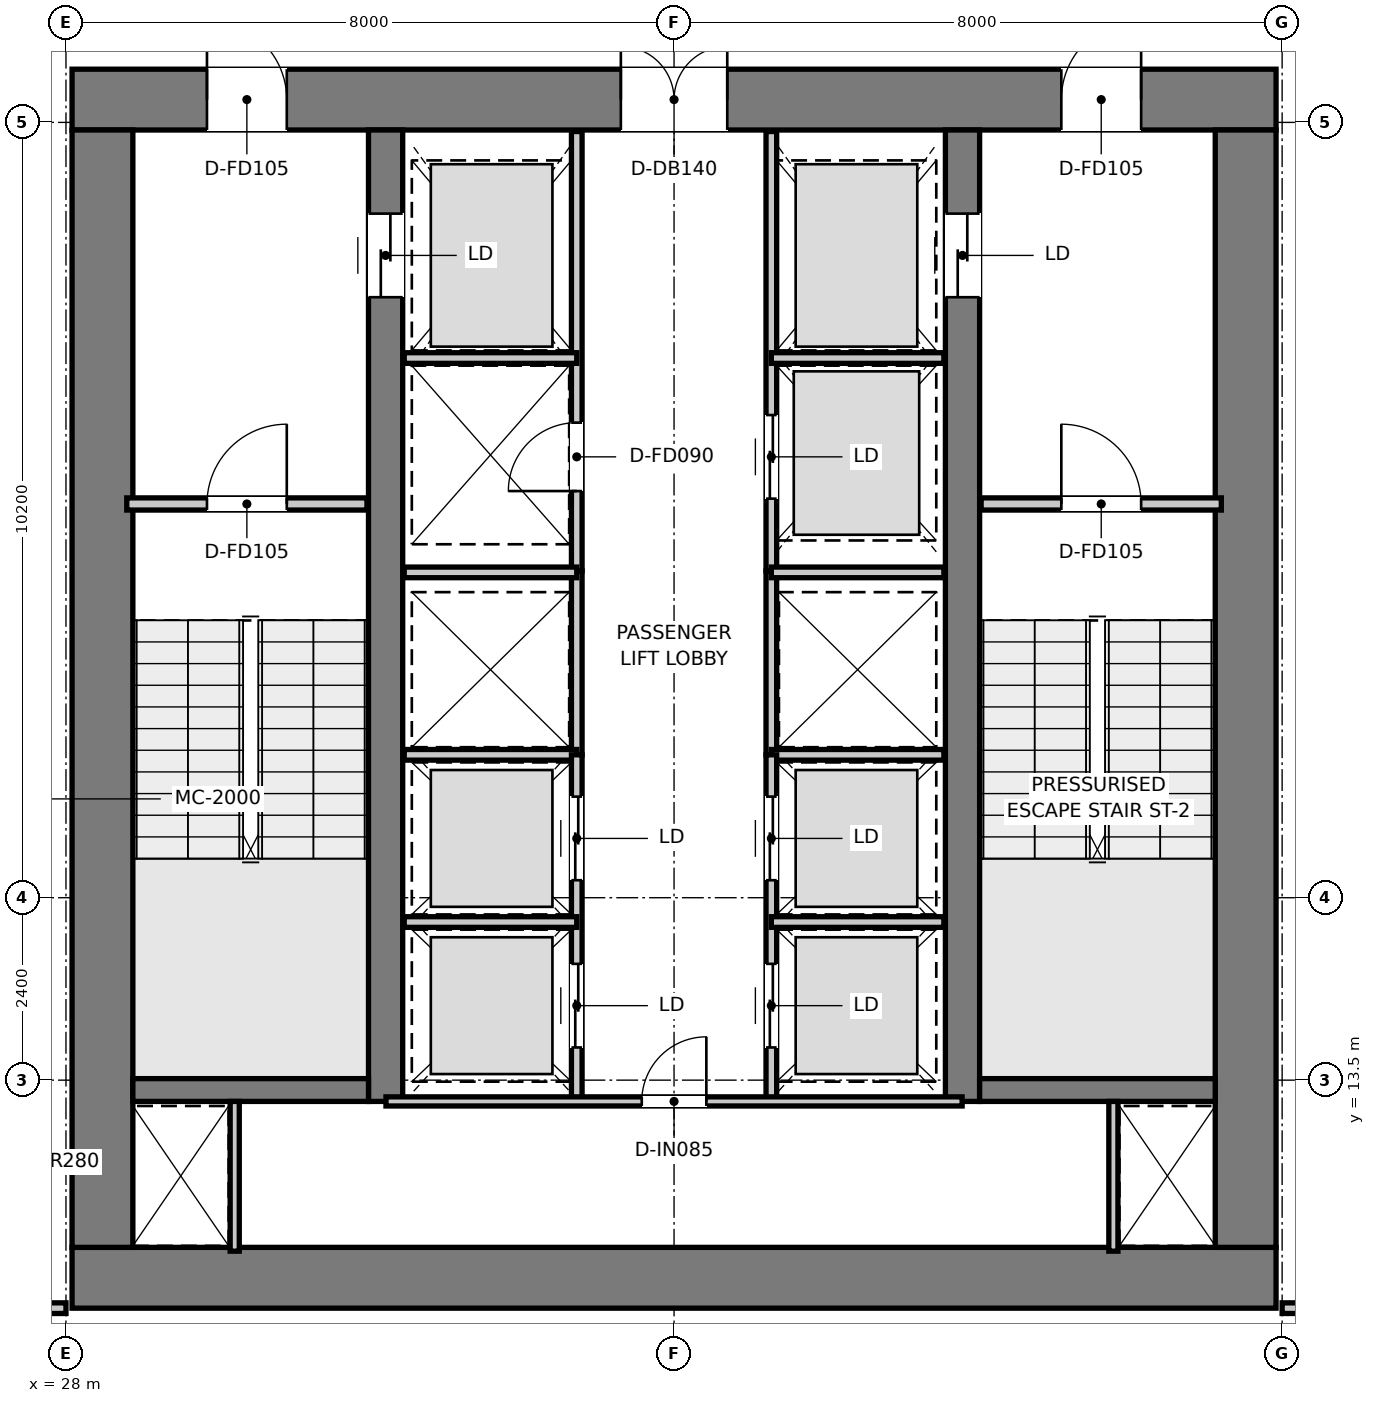
"""IFC4 building model, lengths in metres.
Left out: names, types, materials, properties, quantities, classifications, styles, units other than length and angle.
Written with IfcOpenShell. Run it as: python <this file> out.ifc"""

import sys

from ifc_helpers import new_model, si_unit, direction, frame, frame_2d, origin, place, context, subcontext, project, spatial, rectangle, extrude, element, fill, save


model = new_model("IFC4")
c1 = context("Model", 3, precision=1e-05, world=origin(), true_north=direction((0.0, 1.0)))
c2 = subcontext(c1, "Body", "Model", "MODEL_VIEW")
j1 = project(units=[si_unit("LENGTHUNIT", "METRE"), si_unit("PLANEANGLEUNIT", "RADIAN")], contexts=[c1])
p1 = place(None, origin())
s1 = spatial("IfcSite", under=j1, at=p1, CompositionType="ELEMENT")
p2 = place(p1, origin())
s2 = spatial("IfcBuilding", under=s1, at=p2, CompositionType="ELEMENT")
p3 = place(p2, frame((0.0, 0.0, 113.75)))
s3 = spatial("IfcBuildingStorey", under=s2, at=p3, CompositionType="ELEMENT", Elevation=113.75)
p4 = place(p3, frame((28.08, 10.9, 0.0), z_axis=(0.0, 0.0, 1.0), x_axis=(1.0, 0.0, 0.0)))
e1 = element("IfcWall", 1, at=p4, inside=s3, PredefinedType="SHEAR", context=c2, shape_type="SweptSolid", body=[
    extrude(rectangle(XDim=15.84, YDim=0.8, at=frame_2d((7.92, 0.0))), origin(), (0.0, 0.0, 1.0), 3.95),
])
p5 = place(p3, frame((28.08, 26.4, 0.0), z_axis=(0.0, 0.0, 1.0), x_axis=(1.0, 0.0, 0.0)))
e2 = element("IfcWall", 2, at=p5, inside=s3, PredefinedType="SHEAR", context=c2, shape_type="SweptSolid", body=[
    extrude(rectangle(XDim=15.84, YDim=0.8, at=frame_2d((7.92, 0.0))), origin(), (0.0, 0.0, 1.0), 3.95),
])
p6 = place(p5, frame((7.22, 0.0, 0.0)))
e3 = element("IfcOpeningElement", 3, at=p6, cuts=e2, PredefinedType="OPENING", context=c2, shape_type="SweptSolid", body=[
    extrude(rectangle(XDim=1.4, YDim=2.2, at=frame_2d((0.7, 1.1))), frame((0.0, 0.41, 0.0), z_axis=(0.0, -1.0, 0.0), x_axis=(1.0, 0.0, 0.0)), (0.0, 0.0, 1.0), 0.82),
])
p7 = place(p5, frame((1.775, 0.0, 0.0)))
e4 = element("IfcOpeningElement", 4, at=p7, cuts=e2, PredefinedType="OPENING", context=c2, shape_type="SweptSolid", body=[
    extrude(rectangle(XDim=1.05, YDim=2.1, at=frame_2d((0.525, 1.05))), frame((0.0, 0.41, 0.0), z_axis=(0.0, -1.0, 0.0), x_axis=(1.0, 0.0, 0.0)), (0.0, 0.0, 1.0), 0.82),
])
p8 = place(p5, frame((13.015, 0.0, 0.0)))
e5 = element("IfcOpeningElement", 5, at=p8, cuts=e2, PredefinedType="OPENING", context=c2, shape_type="SweptSolid", body=[
    extrude(rectangle(XDim=1.05, YDim=2.1, at=frame_2d((0.525, 1.05))), frame((0.0, 0.41, 0.0), z_axis=(0.0, -1.0, 0.0), x_axis=(1.0, 0.0, 0.0)), (0.0, 0.0, 1.0), 0.82),
])
for number, where, z_axis, x_axis in (
    (6, (28.48, 11.3, 0.0), (0.0, 0.0, 1.0), (0.0, 1.0, 0.0)),
    (7, (43.52, 11.3, 0.0), (0.0, 0.0, 1.0), (0.0, 1.0, 0.0)),
):
    element("IfcWall", number, at=place(p3, frame(where, z_axis=z_axis, x_axis=x_axis)), inside=s3, PredefinedType="SHEAR", context=c2, shape_type="SweptSolid", body=[
        extrude(rectangle(XDim=14.7, YDim=0.8, at=frame_2d((7.35, 0.0))), origin(), (0.0, 0.0, 1.0), 3.95),
    ])
p9 = place(p3, frame((32.205, 13.22, 0.0), z_axis=(0.0, 0.0, 1.0), x_axis=(0.0, 1.0, 0.0)))
e8 = element("IfcWall", 8, at=p9, inside=s3, PredefinedType="SHEAR", context=c2, shape_type="SweptSolid", body=[
    extrude(rectangle(XDim=12.78, YDim=0.45, at=frame_2d((6.39, 0.0))), origin(), (0.0, 0.0, 1.0), 3.95),
])
p10 = place(p9, frame((10.58, 0.0, 0.0)))
e9 = element("IfcOpeningElement", 9, at=p10, cuts=e8, PredefinedType="OPENING", context=c2, shape_type="SweptSolid", body=[
    extrude(rectangle(XDim=1.1, YDim=2.15, at=frame_2d((0.55, 1.075))), frame((0.0, 0.235, 0.0), z_axis=(0.0, -1.0, 0.0), x_axis=(1.0, 0.0, 0.0)), (0.0, 0.0, 1.0), 0.47),
])
p11 = place(p3, frame((39.795, 13.22, 0.0), z_axis=(0.0, 0.0, 1.0), x_axis=(0.0, 1.0, 0.0)))
e10 = element("IfcWall", 10, at=p11, inside=s3, PredefinedType="SHEAR", context=c2, shape_type="SweptSolid", body=[
    extrude(rectangle(XDim=12.78, YDim=0.45, at=frame_2d((6.39, 0.0))), origin(), (0.0, 0.0, 1.0), 3.95),
])
p12 = place(p11, frame((10.58, 0.0, 0.0)))
e11 = element("IfcOpeningElement", 11, at=p12, cuts=e10, PredefinedType="OPENING", context=c2, shape_type="SweptSolid", body=[
    extrude(rectangle(XDim=1.1, YDim=2.15, at=frame_2d((0.55, 1.075))), frame((0.0, 0.235, 0.0), z_axis=(0.0, -1.0, 0.0), x_axis=(1.0, 0.0, 0.0)), (0.0, 0.0, 1.0), 0.47),
])
for number, where, z_axis, x_axis in (
    (12, (28.88, 13.37, 0.0), (0.0, 0.0, 1.0), (1.0, 0.0, 0.0)),
    (13, (40.02, 13.37, 0.0), (0.0, 0.0, 1.0), (1.0, 0.0, 0.0)),
):
    element("IfcWall", number, at=place(p3, frame(where, z_axis=z_axis, x_axis=x_axis)), inside=s3, PredefinedType="SHEAR", context=c2, shape_type="SweptSolid", body=[
        extrude(rectangle(XDim=3.1, YDim=0.3, at=frame_2d((1.55, 0.0))), origin(), (0.0, 0.0, 1.0), 3.95),
    ])
p13 = place(p3, frame((28.8, 21.08, 0.0), z_axis=(0.0, 0.0, 1.0), x_axis=(1.0, 0.0, 0.0)))
e14 = element("IfcWall", 14, at=p13, inside=s3, PredefinedType="PARTITIONING", context=c2, shape_type="SweptSolid", body=[
    extrude(rectangle(XDim=3.16, YDim=0.16, at=frame_2d((1.58, 0.0))), origin(), (0.0, 0.0, 1.0), 3.67),
])
p14 = place(p13, frame((1.055, 0.0, 0.0)))
e15 = element("IfcOpeningElement", 15, at=p14, cuts=e14, PredefinedType="OPENING", context=c2, shape_type="SweptSolid", body=[
    extrude(rectangle(XDim=1.05, YDim=2.1, at=frame_2d((0.525, 1.05))), frame((0.0, 0.09, 0.0), z_axis=(0.0, -1.0, 0.0), x_axis=(1.0, 0.0, 0.0)), (0.0, 0.0, 1.0), 0.18),
])
p15 = place(p3, frame((40.04, 21.08, 0.0), z_axis=(0.0, 0.0, 1.0), x_axis=(1.0, 0.0, 0.0)))
e16 = element("IfcWall", 16, at=p15, inside=s3, PredefinedType="PARTITIONING", context=c2, shape_type="SweptSolid", body=[
    extrude(rectangle(XDim=3.16, YDim=0.16, at=frame_2d((1.58, 0.0))), origin(), (0.0, 0.0, 1.0), 3.67),
])
p16 = place(p15, frame((1.055, 0.0, 0.0)))
e17 = element("IfcOpeningElement", 17, at=p16, cuts=e16, PredefinedType="OPENING", context=c2, shape_type="SweptSolid", body=[
    extrude(rectangle(XDim=1.05, YDim=2.1, at=frame_2d((0.525, 1.05))), frame((0.0, 0.09, 0.0), z_axis=(0.0, -1.0, 0.0), x_axis=(1.0, 0.0, 0.0)), (0.0, 0.0, 1.0), 0.18),
])
p17 = place(p3, frame((34.72, 20.2, 0.0), z_axis=(0.0, 0.0, 1.0), x_axis=(0.0, 1.0, 0.0)))
e18 = element("IfcWall", 18, at=p17, inside=s3, PredefinedType="PARTITIONING", context=c2, shape_type="SweptSolid", body=[
    extrude(rectangle(XDim=5.78, YDim=0.14, at=frame_2d((2.89, 0.0))), origin(), (0.0, 0.0, 1.0), 2.67),
])
p18 = place(p17, frame((1.05, 0.0, 0.0)))
e19 = element("IfcOpeningElement", 19, at=p18, cuts=e18, PredefinedType="OPENING", context=c2, shape_type="SweptSolid", body=[
    extrude(rectangle(XDim=0.9, YDim=2.1, at=frame_2d((0.45, 1.05))), frame((0.0, 0.08, 0.0), z_axis=(0.0, -1.0, 0.0), x_axis=(1.0, 0.0, 0.0)), (0.0, 0.0, 1.0), 0.16),
])
p19 = place(p3, frame((37.28, 20.2, 0.0), z_axis=(0.0, 0.0, 1.0), x_axis=(0.0, 1.0, 0.0)))
e20 = element("IfcWall", 20, at=p19, inside=s3, PredefinedType="PARTITIONING", context=c2, shape_type="SweptSolid", body=[
    extrude(rectangle(XDim=5.78, YDim=0.14, at=frame_2d((2.89, 0.0))), origin(), (0.0, 0.0, 1.0), 2.67),
])
p20 = place(p19, frame((0.95, 0.0, 0.0)))
e21 = element("IfcOpeningElement", 21, at=p20, cuts=e20, PredefinedType="OPENING", context=c2, shape_type="SweptSolid", body=[
    extrude(rectangle(XDim=1.1, YDim=2.15, at=frame_2d((0.55, 1.075))), frame((0.0, 0.08, 0.0), z_axis=(0.0, -1.0, 0.0), x_axis=(1.0, 0.0, 0.0)), (0.0, 0.0, 1.0), 0.16),
])
for number, where, z_axis, x_axis in (
    (22, (32.45, 23.0, 0.0), (0.0, 0.0, 1.0), (1.0, 0.0, 0.0)),
    (23, (37.28, 23.0, 0.0), (0.0, 0.0, 1.0), (1.0, 0.0, 0.0)),
):
    element("IfcWall", number, at=place(p3, frame(where, z_axis=z_axis, x_axis=x_axis)), inside=s3, PredefinedType="PARTITIONING", context=c2, shape_type="SweptSolid", body=[
        extrude(rectangle(XDim=2.27, YDim=0.14, at=frame_2d((1.135, 0.0))), origin(), (0.0, 0.0, 1.0), 2.67),
    ])
for number, where, z_axis, x_axis in (
    (24, (34.72, 17.78, 0.0), (0.0, 0.0, 1.0), (0.0, 1.0, 0.0)),
    (25, (37.28, 17.78, 0.0), (0.0, 0.0, 1.0), (0.0, 1.0, 0.0)),
):
    element("IfcWall", number, at=place(p3, frame(where, z_axis=z_axis, x_axis=x_axis)), inside=s3, PredefinedType="PARTITIONING", context=c2, shape_type="SweptSolid", body=[
        extrude(rectangle(XDim=2.42, YDim=0.14, at=frame_2d((1.21, 0.0))), origin(), (0.0, 0.0, 1.0), 3.67),
    ])
for number, where, z_axis, x_axis in (
    (26, (32.45, 17.78, 0.0), (0.0, 0.0, 1.0), (1.0, 0.0, 0.0)),
    (27, (32.45, 20.18, 0.0), (0.0, 0.0, 1.0), (1.0, 0.0, 0.0)),
    (28, (37.28, 17.78, 0.0), (0.0, 0.0, 1.0), (1.0, 0.0, 0.0)),
    (29, (37.28, 20.18, 0.0), (0.0, 0.0, 1.0), (1.0, 0.0, 0.0)),
):
    element("IfcWall", number, at=place(p3, frame(where, z_axis=z_axis, x_axis=x_axis)), inside=s3, PredefinedType="PARTITIONING", context=c2, shape_type="SweptSolid", body=[
        extrude(rectangle(XDim=2.27, YDim=0.14, at=frame_2d((1.135, 0.0))), origin(), (0.0, 0.0, 1.0), 3.67),
    ])
p21 = place(p3, frame((34.72, 13.22, 0.0), z_axis=(0.0, 0.0, 1.0), x_axis=(0.0, 1.0, 0.0)))
e30 = element("IfcWall", 30, at=p21, inside=s3, PredefinedType="PARTITIONING", context=c2, shape_type="SweptSolid", body=[
    extrude(rectangle(XDim=4.56, YDim=0.14, at=frame_2d((2.28, 0.0))), origin(), (0.0, 0.0, 1.0), 3.67),
])
p22 = place(p21, frame((0.71, 0.0, 0.0)))
e31 = element("IfcOpeningElement", 31, at=p22, cuts=e30, PredefinedType="OPENING", context=c2, shape_type="SweptSolid", body=[
    extrude(rectangle(XDim=1.1, YDim=2.15, at=frame_2d((0.55, 1.075))), frame((0.0, 0.08, 0.0), z_axis=(0.0, -1.0, 0.0), x_axis=(1.0, 0.0, 0.0)), (0.0, 0.0, 1.0), 0.16),
])
p23 = place(p21, frame((2.91, 0.0, 0.0)))
e32 = element("IfcOpeningElement", 32, at=p23, cuts=e30, PredefinedType="OPENING", context=c2, shape_type="SweptSolid", body=[
    extrude(rectangle(XDim=1.1, YDim=2.15, at=frame_2d((0.55, 1.075))), frame((0.0, 0.08, 0.0), z_axis=(0.0, -1.0, 0.0), x_axis=(1.0, 0.0, 0.0)), (0.0, 0.0, 1.0), 0.16),
])
p24 = place(p3, frame((32.45, 15.58, 0.0), z_axis=(0.0, 0.0, 1.0), x_axis=(1.0, 0.0, 0.0)))
e33 = element("IfcWall", 33, at=p24, inside=s3, PredefinedType="PARTITIONING", context=c2, shape_type="SweptSolid", body=[
    extrude(rectangle(XDim=2.27, YDim=0.14, at=frame_2d((1.135, 0.0))), origin(), (0.0, 0.0, 1.0), 3.67),
])
p25 = place(p3, frame((37.28, 13.22, 0.0), z_axis=(0.0, 0.0, 1.0), x_axis=(0.0, 1.0, 0.0)))
e34 = element("IfcWall", 34, at=p25, inside=s3, PredefinedType="PARTITIONING", context=c2, shape_type="SweptSolid", body=[
    extrude(rectangle(XDim=4.56, YDim=0.14, at=frame_2d((2.28, 0.0))), origin(), (0.0, 0.0, 1.0), 3.67),
])
p26 = place(p25, frame((0.71, 0.0, 0.0)))
e35 = element("IfcOpeningElement", 35, at=p26, cuts=e34, PredefinedType="OPENING", context=c2, shape_type="SweptSolid", body=[
    extrude(rectangle(XDim=1.1, YDim=2.15, at=frame_2d((0.55, 1.075))), frame((0.0, 0.08, 0.0), z_axis=(0.0, -1.0, 0.0), x_axis=(1.0, 0.0, 0.0)), (0.0, 0.0, 1.0), 0.16),
])
p27 = place(p25, frame((2.91, 0.0, 0.0)))
e36 = element("IfcOpeningElement", 36, at=p27, cuts=e34, PredefinedType="OPENING", context=c2, shape_type="SweptSolid", body=[
    extrude(rectangle(XDim=1.1, YDim=2.15, at=frame_2d((0.55, 1.075))), frame((0.0, 0.08, 0.0), z_axis=(0.0, -1.0, 0.0), x_axis=(1.0, 0.0, 0.0)), (0.0, 0.0, 1.0), 0.16),
])
p28 = place(p3, frame((37.28, 15.58, 0.0), z_axis=(0.0, 0.0, 1.0), x_axis=(1.0, 0.0, 0.0)))
e37 = element("IfcWall", 37, at=p28, inside=s3, PredefinedType="PARTITIONING", context=c2, shape_type="SweptSolid", body=[
    extrude(rectangle(XDim=2.27, YDim=0.14, at=frame_2d((1.135, 0.0))), origin(), (0.0, 0.0, 1.0), 3.67),
])
for number, where, z_axis, x_axis in (
    (38, (30.22, 11.25, 0.0), (0.0, 0.0, 1.0), (0.0, 1.0, 0.0)),
    (39, (41.78, 11.25, 0.0), (0.0, 0.0, 1.0), (0.0, 1.0, 0.0)),
):
    element("IfcWall", number, at=place(p3, frame(where, z_axis=z_axis, x_axis=x_axis)), inside=s3, PredefinedType="PARTITIONING", context=c2, shape_type="SweptSolid", body=[
        extrude(rectangle(XDim=1.97, YDim=0.12, at=frame_2d((0.985, 0.0))), origin(), (0.0, 0.0, 1.0), 3.67),
    ])
p29 = place(p3, frame((32.21, 13.22, 0.0), z_axis=(0.0, 0.0, 1.0), x_axis=(1.0, 0.0, 0.0)))
e40 = element("IfcWall", 40, at=p29, inside=s3, PredefinedType="PARTITIONING", context=c2, shape_type="SweptSolid", body=[
    extrude(rectangle(XDim=7.58, YDim=0.12, at=frame_2d((3.79, 0.0))), origin(), (0.0, 0.0, 1.0), 3.67),
])
p30 = place(p29, frame((3.365, 0.0, 0.0)))
e41 = element("IfcOpeningElement", 41, at=p30, cuts=e40, PredefinedType="OPENING", context=c2, shape_type="SweptSolid", body=[
    extrude(rectangle(XDim=0.85, YDim=2.1, at=frame_2d((0.425, 1.05))), frame((0.0, 0.07, 0.0), z_axis=(0.0, -1.0, 0.0), x_axis=(1.0, 0.0, 0.0)), (0.0, 0.0, 1.0), 0.14),
])
p31 = place(p3, frame((26.32, 10.5, 0.0), z_axis=(0.0, 0.0, 1.0), x_axis=(1.0, 0.0, 0.0)))
e42 = element("IfcWall", 42, at=p31, inside=s3, PredefinedType="PARTITIONING", context=c2, shape_type="SweptSolid", body=[
    extrude(rectangle(XDim=1.68, YDim=0.14, at=frame_2d((0.84, 0.0))), origin(), (0.0, 0.0, 1.0), 3.67),
])
p32 = place(p31, frame((0.445, 0.0, 0.0)))
e43 = element("IfcOpeningElement", 43, at=p32, cuts=e42, PredefinedType="OPENING", context=c2, shape_type="SweptSolid", body=[
    extrude(rectangle(XDim=0.85, YDim=2.1, at=frame_2d((0.425, 1.05))), frame((0.0, 0.08, 0.0), z_axis=(0.0, -1.0, 0.0), x_axis=(1.0, 0.0, 0.0)), (0.0, 0.0, 1.0), 0.16),
])
p33 = place(p3, frame((44.0, 10.5, 0.0), z_axis=(0.0, 0.0, 1.0), x_axis=(1.0, 0.0, 0.0)))
e44 = element("IfcWall", 44, at=p33, inside=s3, PredefinedType="PARTITIONING", context=c2, shape_type="SweptSolid", body=[
    extrude(rectangle(XDim=1.68, YDim=0.14, at=frame_2d((0.84, 0.0))), origin(), (0.0, 0.0, 1.0), 3.67),
])
p34 = place(p14, origin())
e45 = element("IfcDoor", 45, at=p34, inside=s3, OperationType="SINGLE_SWING_RIGHT", PredefinedType="DOOR", context=c2, shape_type="SweptSolid", body=[
    extrude(rectangle(XDim=1.05, YDim=2.1, at=frame_2d((0.525, 1.05))), frame((0.0, 0.025, 0.0), z_axis=(0.0, -1.0, 0.0), x_axis=(1.0, 0.0, 0.0)), (0.0, 0.0, 1.0), 0.05),
])
fill(e15, e45)
p35 = place(p16, origin())
e46 = element("IfcDoor", 46, at=p35, inside=s3, OperationType="SINGLE_SWING_LEFT", PredefinedType="DOOR", context=c2, shape_type="SweptSolid", body=[
    extrude(rectangle(XDim=1.05, YDim=2.1, at=frame_2d((0.525, 1.05))), frame((0.0, 0.025, 0.0), z_axis=(0.0, -1.0, 0.0), x_axis=(1.0, 0.0, 0.0)), (0.0, 0.0, 1.0), 0.05),
])
fill(e17, e46)
p36 = place(p6, origin())
e47 = element("IfcDoor", 47, at=p36, inside=s3, OperationType="DOUBLE_DOOR_SINGLE_SWING", PredefinedType="DOOR", context=c2, shape_type="SweptSolid", body=[
    extrude(rectangle(XDim=1.4, YDim=2.2, at=frame_2d((0.7, 1.1))), frame((0.0, 0.025, 0.0), z_axis=(0.0, -1.0, 0.0), x_axis=(1.0, 0.0, 0.0)), (0.0, 0.0, 1.0), 0.05),
])
fill(e3, e47)
p37 = place(p7, origin())
e48 = element("IfcDoor", 48, at=p37, inside=s3, OperationType="SINGLE_SWING_LEFT", PredefinedType="DOOR", context=c2, shape_type="SweptSolid", body=[
    extrude(rectangle(XDim=1.05, YDim=2.1, at=frame_2d((0.525, 1.05))), frame((0.0, 0.025, 0.0), z_axis=(0.0, -1.0, 0.0), x_axis=(1.0, 0.0, 0.0)), (0.0, 0.0, 1.0), 0.05),
])
fill(e4, e48)
p38 = place(p8, origin())
e49 = element("IfcDoor", 49, at=p38, inside=s3, OperationType="SINGLE_SWING_RIGHT", PredefinedType="DOOR", context=c2, shape_type="SweptSolid", body=[
    extrude(rectangle(XDim=1.05, YDim=2.1, at=frame_2d((0.525, 1.05))), frame((0.0, 0.025, 0.0), z_axis=(0.0, -1.0, 0.0), x_axis=(1.0, 0.0, 0.0)), (0.0, 0.0, 1.0), 0.05),
])
fill(e5, e49)
p39 = place(p10, origin())
e50 = element("IfcDoor", 50, at=p39, inside=s3, OperationType="DOUBLE_DOOR_SLIDING", PredefinedType="DOOR", context=c2, shape_type="SweptSolid", body=[
    extrude(rectangle(XDim=1.1, YDim=2.15, at=frame_2d((0.55, 1.075))), frame((0.0, 0.025, 0.0), z_axis=(0.0, -1.0, 0.0), x_axis=(1.0, 0.0, 0.0)), (0.0, 0.0, 1.0), 0.05),
])
fill(e9, e50)
p40 = place(p12, origin())
e51 = element("IfcDoor", 51, at=p40, inside=s3, OperationType="DOUBLE_DOOR_SLIDING", PredefinedType="DOOR", context=c2, shape_type="SweptSolid", body=[
    extrude(rectangle(XDim=1.1, YDim=2.15, at=frame_2d((0.55, 1.075))), frame((0.0, 0.025, 0.0), z_axis=(0.0, -1.0, 0.0), x_axis=(1.0, 0.0, 0.0)), (0.0, 0.0, 1.0), 0.05),
])
fill(e11, e51)
p41 = place(p18, origin())
e52 = element("IfcDoor", 52, at=p41, inside=s3, OperationType="SINGLE_SWING_LEFT", PredefinedType="DOOR", context=c2, shape_type="SweptSolid", body=[
    extrude(rectangle(XDim=0.9, YDim=2.1, at=frame_2d((0.45, 1.05))), frame((0.0, 0.025, 0.0), z_axis=(0.0, -1.0, 0.0), x_axis=(1.0, 0.0, 0.0)), (0.0, 0.0, 1.0), 0.05),
])
fill(e19, e52)
p42 = place(p20, origin())
e53 = element("IfcDoor", 53, at=p42, inside=s3, OperationType="DOUBLE_DOOR_SLIDING", PredefinedType="DOOR", context=c2, shape_type="SweptSolid", body=[
    extrude(rectangle(XDim=1.1, YDim=2.15, at=frame_2d((0.55, 1.075))), frame((0.0, 0.025, 0.0), z_axis=(0.0, -1.0, 0.0), x_axis=(1.0, 0.0, 0.0)), (0.0, 0.0, 1.0), 0.05),
])
fill(e21, e53)
p43 = place(p22, origin())
e54 = element("IfcDoor", 54, at=p43, inside=s3, OperationType="DOUBLE_DOOR_SLIDING", PredefinedType="DOOR", context=c2, shape_type="SweptSolid", body=[
    extrude(rectangle(XDim=1.1, YDim=2.15, at=frame_2d((0.55, 1.075))), frame((0.0, 0.025, 0.0), z_axis=(0.0, -1.0, 0.0), x_axis=(1.0, 0.0, 0.0)), (0.0, 0.0, 1.0), 0.05),
])
fill(e31, e54)
p44 = place(p23, origin())
e55 = element("IfcDoor", 55, at=p44, inside=s3, OperationType="DOUBLE_DOOR_SLIDING", PredefinedType="DOOR", context=c2, shape_type="SweptSolid", body=[
    extrude(rectangle(XDim=1.1, YDim=2.15, at=frame_2d((0.55, 1.075))), frame((0.0, 0.025, 0.0), z_axis=(0.0, -1.0, 0.0), x_axis=(1.0, 0.0, 0.0)), (0.0, 0.0, 1.0), 0.05),
])
fill(e32, e55)
p45 = place(p26, origin())
e56 = element("IfcDoor", 56, at=p45, inside=s3, OperationType="DOUBLE_DOOR_SLIDING", PredefinedType="DOOR", context=c2, shape_type="SweptSolid", body=[
    extrude(rectangle(XDim=1.1, YDim=2.15, at=frame_2d((0.55, 1.075))), frame((0.0, 0.025, 0.0), z_axis=(0.0, -1.0, 0.0), x_axis=(1.0, 0.0, 0.0)), (0.0, 0.0, 1.0), 0.05),
])
fill(e35, e56)
p46 = place(p27, origin())
e57 = element("IfcDoor", 57, at=p46, inside=s3, OperationType="DOUBLE_DOOR_SLIDING", PredefinedType="DOOR", context=c2, shape_type="SweptSolid", body=[
    extrude(rectangle(XDim=1.1, YDim=2.15, at=frame_2d((0.55, 1.075))), frame((0.0, 0.025, 0.0), z_axis=(0.0, -1.0, 0.0), x_axis=(1.0, 0.0, 0.0)), (0.0, 0.0, 1.0), 0.05),
])
fill(e36, e57)
p47 = place(p30, origin())
e58 = element("IfcDoor", 58, at=p47, inside=s3, OperationType="SINGLE_SWING_RIGHT", PredefinedType="DOOR", context=c2, shape_type="SweptSolid", body=[
    extrude(rectangle(XDim=0.85, YDim=2.1, at=frame_2d((0.425, 1.05))), frame((0.0, 0.025, 0.0), z_axis=(0.0, -1.0, 0.0), x_axis=(1.0, 0.0, 0.0)), (0.0, 0.0, 1.0), 0.05),
])
fill(e41, e58)
save(model, sys.argv[1])
